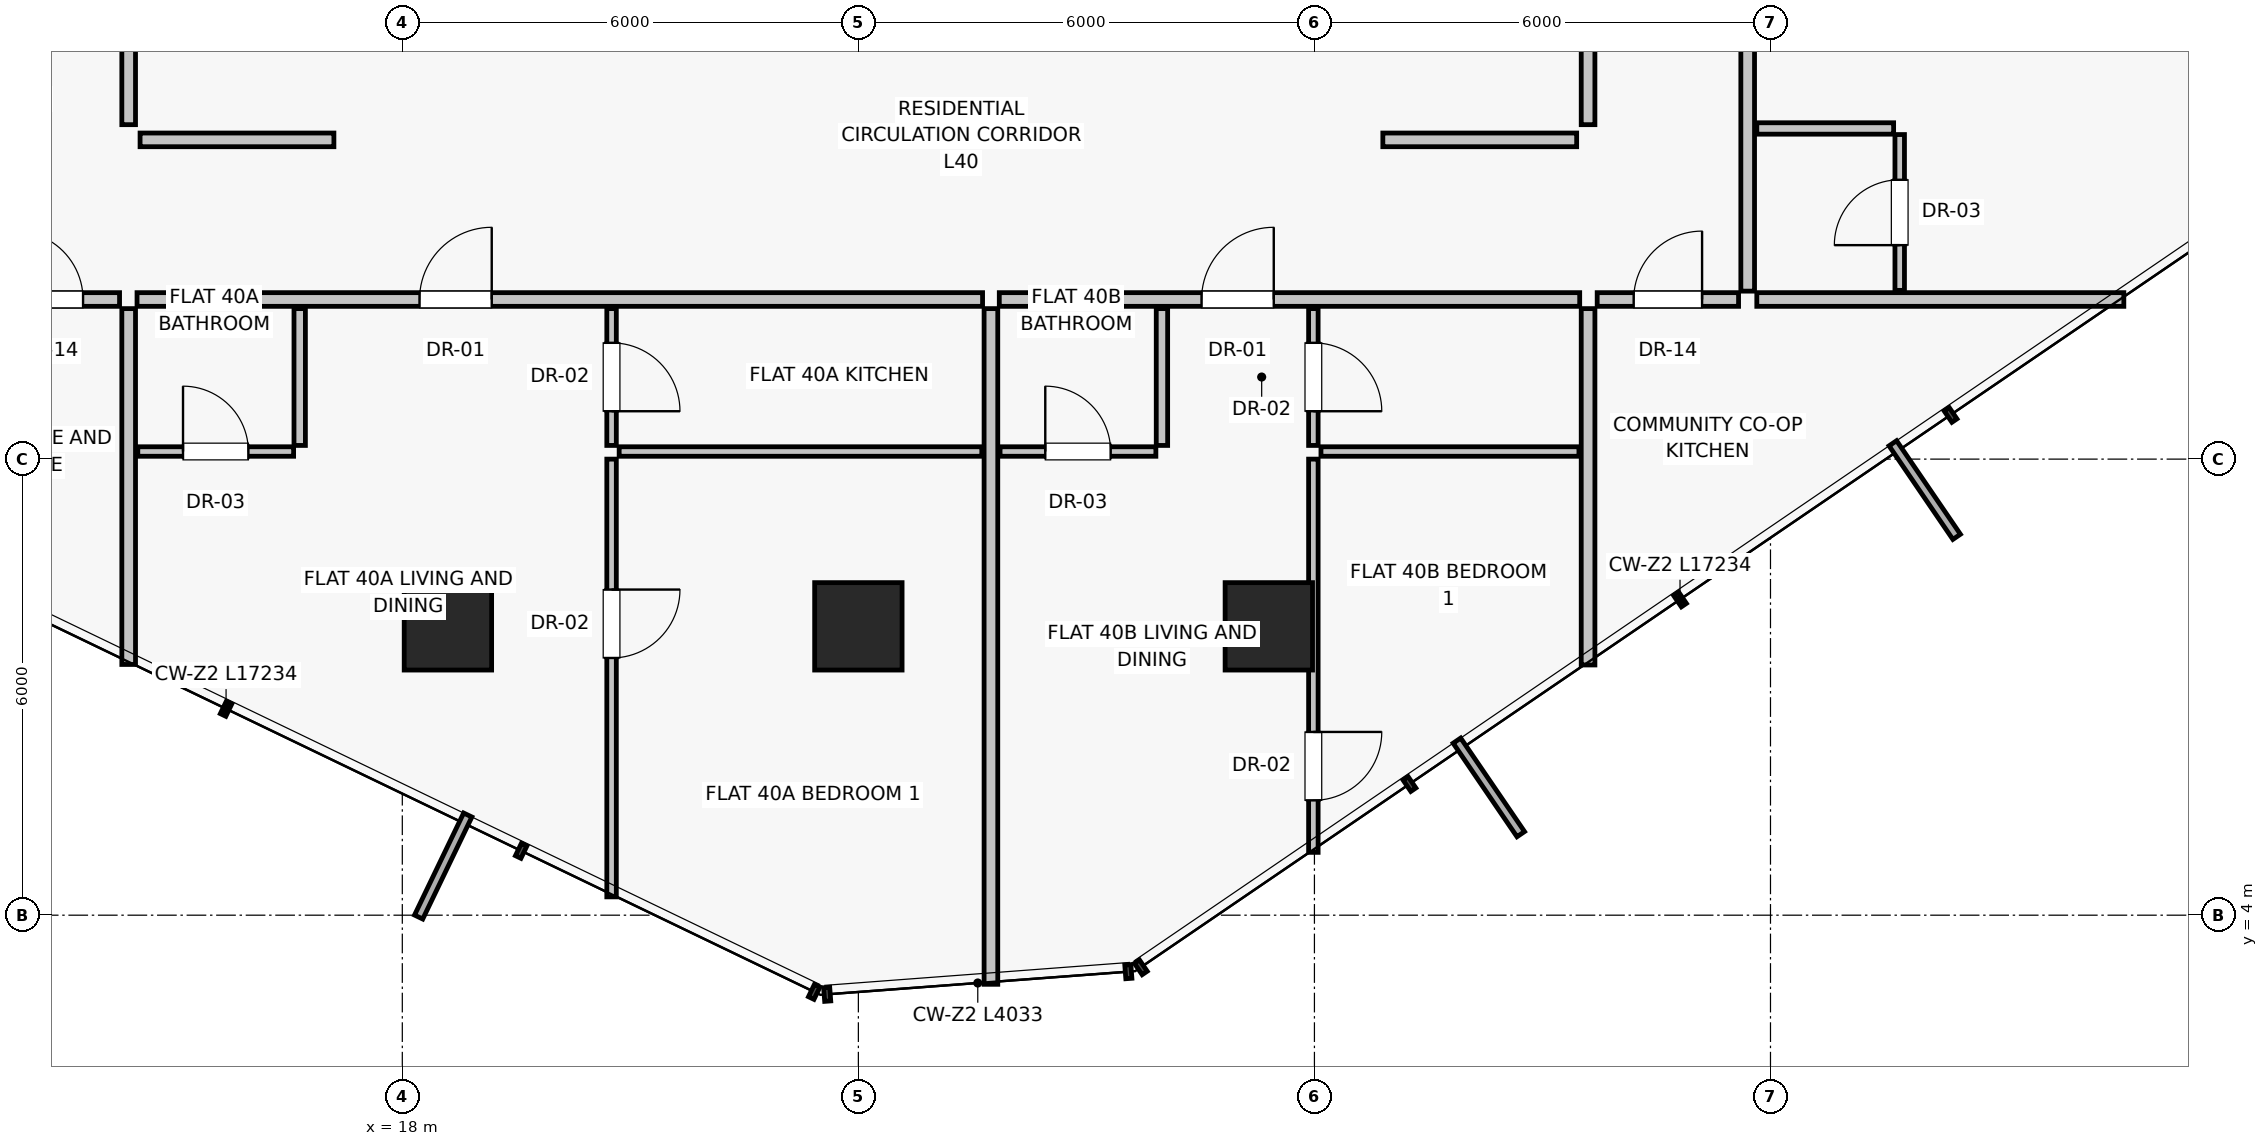
"""IFC4 building model, lengths in metres.
Left out: names, types, materials, properties, quantities, classifications, styles, units other than length and angle.
Written with IfcOpenShell. Run it as: python <this file> out.ifc"""

import sys

from ifc_helpers import new_model, si_unit, direction, frame, frame_2d, origin, origin_2d, place, context, subcontext, project, spatial, rectangle, extrude, source, transform, mapped, element, fill, save


model = new_model("IFC4")
c1 = context("Model", 3, precision=1e-05, world=origin(), true_north=direction((0.0, 1.0)))
c2 = subcontext(c1, "Body", "Model", "MODEL_VIEW")
j1 = project(units=[si_unit("LENGTHUNIT", "METRE"), si_unit("PLANEANGLEUNIT", "RADIAN")], contexts=[c1])
p1 = place(None, origin())
s1 = spatial("IfcSite", under=j1, at=p1, CompositionType="ELEMENT")
p2 = place(p1, origin())
s2 = spatial("IfcBuilding", under=s1, at=p2, CompositionType="ELEMENT")
p3 = place(p2, frame((0.0, 0.0, 142.5)))
s3 = spatial("IfcBuildingStorey", under=s2, at=p3, CompositionType="ELEMENT", Elevation=142.5)
for number, where, z_axis, x_axis in (
    (1, (18.6, 7.8, 0.0), (0.0, 0.0, 1.0), (1.0, 0.0, 0.0)),
    (2, (24.0, 7.8, 0.0), (0.0, 0.0, 1.0), (1.0, 0.0, 0.0)),
    (3, (29.4, 7.8, 0.0), (0.0, 0.0, 1.0), (1.0, 0.0, 0.0)),
):
    element("IfcColumn", number, at=place(p3, frame(where, z_axis=z_axis, x_axis=x_axis)), inside=s3, PredefinedType="COLUMN", context=c2, shape_type="SweptSolid", body=[
        extrude(rectangle(XDim=1.15, YDim=1.15, at=origin_2d()), origin(), (0.0, 0.0, 1.0), 3.25),
    ])
p4 = place(p3, frame((14.4, 14.4, 0.0), z_axis=(0.0, 0.0, 1.0), x_axis=(0.0, 1.0, 0.0)))
e4 = element("IfcWall", 4, at=p4, inside=s3, PredefinedType="PARTITIONING", context=c2, shape_type="SweptSolid", body=[
    extrude(rectangle(XDim=9.4, YDim=0.18, at=frame_2d((4.7, 0.0))), origin(), (0.0, 0.0, 1.0), 3.0),
])
p5 = place(p4, frame((3.8, 0.0, 0.0)))
e5 = element("IfcOpeningElement", 5, at=p5, cuts=e4, PredefinedType="OPENING", context=c2, shape_type="SweptSolid", body=[
    extrude(rectangle(XDim=0.9, YDim=2.01, at=frame_2d((0.45, 1.005))), frame((0.0, 0.1, 0.0), z_axis=(0.0, -1.0, 0.0), x_axis=(1.0, 0.0, 0.0)), (0.0, 0.0, 1.0), 0.2),
])
p6 = place(p3, frame((33.6, 14.4, 0.0), z_axis=(0.0, 0.0, 1.0), x_axis=(0.0, 1.0, 0.0)))
e6 = element("IfcWall", 6, at=p6, inside=s3, PredefinedType="PARTITIONING", context=c2, shape_type="SweptSolid", body=[
    extrude(rectangle(XDim=9.4, YDim=0.18, at=frame_2d((4.7, 0.0))), origin(), (0.0, 0.0, 1.0), 3.0),
])
p7 = place(p6, frame((3.8, 0.0, 0.0)))
e7 = element("IfcOpeningElement", 7, at=p7, cuts=e6, PredefinedType="OPENING", context=c2, shape_type="SweptSolid", body=[
    extrude(rectangle(XDim=0.9, YDim=2.01, at=frame_2d((0.45, 1.005))), frame((0.0, 0.1, 0.0), z_axis=(0.0, -1.0, 0.0), x_axis=(1.0, 0.0, 0.0)), (0.0, 0.0, 1.0), 0.2),
])
for number, where, z_axis, x_axis in (
    (8, (14.55, 14.2, 0.0), (0.0, 0.0, 1.0), (1.0, 0.0, 0.0)),
    (9, (30.9, 14.2, 0.0), (0.0, 0.0, 1.0), (1.0, 0.0, 0.0)),
):
    element("IfcWall", number, at=place(p3, frame(where, z_axis=z_axis, x_axis=x_axis)), inside=s3, PredefinedType="PARTITIONING", context=c2, shape_type="SweptSolid", body=[
        extrude(rectangle(XDim=2.55, YDim=0.18, at=frame_2d((1.275, 0.0))), origin(), (0.0, 0.0, 1.0), 3.0),
    ])
p8 = place(p3, frame((14.4, 11.98, 0.0), z_axis=(0.0, 0.0, 1.0), x_axis=(0.0, -1.0, 0.0)))
e10 = element("IfcWall", 10, at=p8, inside=s3, PredefinedType="PARTITIONING", context=c2, shape_type="SweptSolid", body=[
    extrude(rectangle(XDim=4.681, YDim=0.18, at=frame_2d((2.341, 0.0))), origin(), (0.0, 0.0, 1.0), 3.0),
])
p9 = place(p3, frame((33.6, 11.98, 0.0), z_axis=(0.0, 0.0, 1.0), x_axis=(0.0, -1.0, 0.0)))
e11 = element("IfcWall", 11, at=p9, inside=s3, PredefinedType="PARTITIONING", context=c2, shape_type="SweptSolid", body=[
    extrude(rectangle(XDim=4.688, YDim=0.18, at=frame_2d((2.344, 0.0))), origin(), (0.0, 0.0, 1.0), 3.0),
])
p10 = place(p3, frame((14.51, 12.1, 0.0), z_axis=(0.0, 0.0, 1.0), x_axis=(1.0, 0.0, 0.0)))
e12 = element("IfcWall", 12, at=p10, inside=s3, PredefinedType="PARTITIONING", context=c2, shape_type="SweptSolid", body=[
    extrude(rectangle(XDim=11.124, YDim=0.18, at=frame_2d((5.562, 0.0))), origin(), (0.0, 0.0, 1.0), 2.58),
])
p11 = place(p10, frame((3.717, 0.0, 0.0)))
e13 = element("IfcOpeningElement", 13, at=p11, cuts=e12, PredefinedType="OPENING", context=c2, shape_type="SweptSolid", body=[
    extrude(rectangle(XDim=0.95, YDim=2.02, at=frame_2d((0.475, 1.01))), frame((0.0, 0.1, 0.0), z_axis=(0.0, -1.0, 0.0), x_axis=(1.0, 0.0, 0.0)), (0.0, 0.0, 1.0), 0.2),
])
p12 = place(p3, frame((16.65, 11.98, 0.0), z_axis=(0.0, 0.0, 1.0), x_axis=(0.0, -1.0, 0.0)))
e14 = element("IfcWall", 14, at=p12, inside=s3, PredefinedType="PARTITIONING", context=c2, shape_type="SweptSolid", body=[
    extrude(rectangle(XDim=1.8, YDim=0.15, at=frame_2d((0.9, 0.0))), origin(), (0.0, 0.0, 1.0), 3.0),
])
p13 = place(p3, frame((14.52, 10.1, 0.0), z_axis=(0.0, 0.0, 1.0), x_axis=(1.0, 0.0, 0.0)))
e15 = element("IfcWall", 15, at=p13, inside=s3, PredefinedType="PARTITIONING", context=c2, shape_type="SweptSolid", body=[
    extrude(rectangle(XDim=2.05, YDim=0.125, at=frame_2d((1.025, 0.0))), origin(), (0.0, 0.0, 1.0), 3.0),
])
p14 = place(p13, frame((0.595, 0.0, 0.0)))
e16 = element("IfcOpeningElement", 16, at=p14, cuts=e15, PredefinedType="OPENING", context=c2, shape_type="SweptSolid", body=[
    extrude(rectangle(XDim=0.86, YDim=2.01, at=frame_2d((0.43, 1.005))), frame((0.0, 0.073, 0.0), z_axis=(0.0, -1.0, 0.0), x_axis=(1.0, 0.0, 0.0)), (0.0, 0.0, 1.0), 0.145),
])
p15 = place(p3, frame((20.753, 11.98, 0.0), z_axis=(0.0, 0.0, 1.0), x_axis=(0.0, -1.0, 0.0)))
e17 = element("IfcWall", 17, at=p15, inside=s3, PredefinedType="PARTITIONING", context=c2, shape_type="SweptSolid", body=[
    extrude(rectangle(XDim=1.8, YDim=0.125, at=frame_2d((0.9, 0.0))), origin(), (0.0, 0.0, 1.0), 3.0),
])
p16 = place(p15, frame((0.45, 0.0, 0.0)))
e18 = element("IfcOpeningElement", 18, at=p16, cuts=e17, PredefinedType="OPENING", context=c2, shape_type="SweptSolid", body=[
    extrude(rectangle(XDim=0.9, YDim=2.01, at=frame_2d((0.45, 1.005))), frame((0.0, 0.073, 0.0), z_axis=(0.0, -1.0, 0.0), x_axis=(1.0, 0.0, 0.0)), (0.0, 0.0, 1.0), 0.145),
])
p17 = place(p3, frame((20.853, 10.1, 0.0), z_axis=(0.0, 0.0, 1.0), x_axis=(1.0, 0.0, 0.0)))
e19 = element("IfcWall", 19, at=p17, inside=s3, PredefinedType="PARTITIONING", context=c2, shape_type="SweptSolid", body=[
    extrude(rectangle(XDim=4.771, YDim=0.125, at=frame_2d((2.385, 0.0))), origin(), (0.0, 0.0, 1.0), 3.0),
])
p18 = place(p3, frame((20.753, 10.0, 0.0), z_axis=(0.0, 0.0, 1.0), x_axis=(0.0, -1.0, 0.0)))
e20 = element("IfcWall", 20, at=p18, inside=s3, PredefinedType="PARTITIONING", context=c2, shape_type="SweptSolid", body=[
    extrude(rectangle(XDim=5.759, YDim=0.125, at=frame_2d((2.879, 0.0))), origin(), (0.0, 0.0, 1.0), 3.0),
])
p19 = place(p18, frame((1.716, 0.0, 0.0)))
e21 = element("IfcOpeningElement", 21, at=p19, cuts=e20, PredefinedType="OPENING", context=c2, shape_type="SweptSolid", body=[
    extrude(rectangle(XDim=0.9, YDim=2.01, at=frame_2d((0.45, 1.005))), frame((0.0, 0.073, 0.0), z_axis=(0.0, -1.0, 0.0), x_axis=(1.0, 0.0, 0.0)), (0.0, 0.0, 1.0), 0.145),
])
p20 = place(p3, frame((25.744, 11.98, 0.0), z_axis=(0.0, 0.0, 1.0), x_axis=(0.0, -1.0, 0.0)))
e22 = element("IfcWall", 22, at=p20, inside=s3, PredefinedType="PARTITIONING", context=c2, shape_type="SweptSolid", body=[
    extrude(rectangle(XDim=8.889, YDim=0.18, at=frame_2d((4.445, 0.0))), origin(), (0.0, 0.0, 1.0), 3.0),
])
p21 = place(p3, frame((25.854, 12.1, 0.0), z_axis=(0.0, 0.0, 1.0), x_axis=(1.0, 0.0, 0.0)))
e23 = element("IfcWall", 23, at=p21, inside=s3, PredefinedType="PARTITIONING", context=c2, shape_type="SweptSolid", body=[
    extrude(rectangle(XDim=7.636, YDim=0.18, at=frame_2d((3.818, 0.0))), origin(), (0.0, 0.0, 1.0), 2.58),
])
p22 = place(p21, frame((2.661, 0.0, 0.0)))
e24 = element("IfcOpeningElement", 24, at=p22, cuts=e23, PredefinedType="OPENING", context=c2, shape_type="SweptSolid", body=[
    extrude(rectangle(XDim=0.95, YDim=2.02, at=frame_2d((0.475, 1.01))), frame((0.0, 0.1, 0.0), z_axis=(0.0, -1.0, 0.0), x_axis=(1.0, 0.0, 0.0)), (0.0, 0.0, 1.0), 0.2),
])
p23 = place(p3, frame((27.994, 11.98, 0.0), z_axis=(0.0, 0.0, 1.0), x_axis=(0.0, -1.0, 0.0)))
e25 = element("IfcWall", 25, at=p23, inside=s3, PredefinedType="PARTITIONING", context=c2, shape_type="SweptSolid", body=[
    extrude(rectangle(XDim=1.8, YDim=0.15, at=frame_2d((0.9, 0.0))), origin(), (0.0, 0.0, 1.0), 3.0),
])
p24 = place(p3, frame((25.864, 10.1, 0.0), z_axis=(0.0, 0.0, 1.0), x_axis=(1.0, 0.0, 0.0)))
e26 = element("IfcWall", 26, at=p24, inside=s3, PredefinedType="PARTITIONING", context=c2, shape_type="SweptSolid", body=[
    extrude(rectangle(XDim=2.05, YDim=0.125, at=frame_2d((1.025, 0.0))), origin(), (0.0, 0.0, 1.0), 3.0),
])
p25 = place(p24, frame((0.595, 0.0, 0.0)))
e27 = element("IfcOpeningElement", 27, at=p25, cuts=e26, PredefinedType="OPENING", context=c2, shape_type="SweptSolid", body=[
    extrude(rectangle(XDim=0.86, YDim=2.01, at=frame_2d((0.43, 1.005))), frame((0.0, 0.073, 0.0), z_axis=(0.0, -1.0, 0.0), x_axis=(1.0, 0.0, 0.0)), (0.0, 0.0, 1.0), 0.145),
])
p26 = place(p3, frame((29.986, 11.98, 0.0), z_axis=(0.0, 0.0, 1.0), x_axis=(0.0, -1.0, 0.0)))
e28 = element("IfcWall", 28, at=p26, inside=s3, PredefinedType="PARTITIONING", context=c2, shape_type="SweptSolid", body=[
    extrude(rectangle(XDim=1.8, YDim=0.125, at=frame_2d((0.9, 0.0))), origin(), (0.0, 0.0, 1.0), 2.378),
])
p27 = place(p26, frame((0.45, 0.0, 0.0)))
e29 = element("IfcOpeningElement", 29, at=p27, cuts=e28, PredefinedType="OPENING", context=c2, shape_type="SweptSolid", body=[
    extrude(rectangle(XDim=0.9, YDim=2.01, at=frame_2d((0.45, 1.005))), frame((0.0, 0.073, 0.0), z_axis=(0.0, -1.0, 0.0), x_axis=(1.0, 0.0, 0.0)), (0.0, 0.0, 1.0), 0.145),
])
p28 = place(p3, frame((30.086, 10.1, 0.0), z_axis=(0.0, 0.0, 1.0), x_axis=(1.0, 0.0, 0.0)))
e30 = element("IfcWall", 30, at=p28, inside=s3, PredefinedType="PARTITIONING", context=c2, shape_type="SweptSolid", body=[
    extrude(rectangle(XDim=3.394, YDim=0.125, at=frame_2d((1.697, 0.0))), origin(), (0.0, 0.0, 1.0), 3.0),
])
p29 = place(p3, frame((29.986, 10.0, 0.0), z_axis=(0.0, 0.0, 1.0), x_axis=(0.0, -1.0, 0.0)))
e31 = element("IfcWall", 31, at=p29, inside=s3, PredefinedType="PARTITIONING", context=c2, shape_type="SweptSolid", body=[
    extrude(rectangle(XDim=5.174, YDim=0.125, at=frame_2d((2.587, 0.0))), origin(), (0.0, 0.0, 1.0), 2.378),
])
p30 = place(p29, frame((3.589, 0.0, 0.0)))
e32 = element("IfcOpeningElement", 32, at=p30, cuts=e31, PredefinedType="OPENING", context=c2, shape_type="SweptSolid", body=[
    extrude(rectangle(XDim=0.9, YDim=2.01, at=frame_2d((0.45, 1.005))), frame((0.0, 0.073, 0.0), z_axis=(0.0, -1.0, 0.0), x_axis=(1.0, 0.0, 0.0)), (0.0, 0.0, 1.0), 0.145),
])
p31 = place(p3, frame((35.82, 12.1, 0.0), z_axis=(0.0, 0.0, 1.0), x_axis=(1.0, 0.0, 0.0)))
e33 = element("IfcWall", 33, at=p31, inside=s3, PredefinedType="PARTITIONING", context=c2, shape_type="SweptSolid", body=[
    extrude(rectangle(XDim=4.829, YDim=0.18, at=frame_2d((2.414, 0.0))), origin(), (0.0, 0.0, 1.0), 3.0),
])
p32 = place(p3, frame((35.7, 12.21, 0.0), z_axis=(0.0, 0.0, 1.0), x_axis=(0.0, 1.0, 0.0)))
e34 = element("IfcWall", 34, at=p32, inside=s3, PredefinedType="PARTITIONING", context=c2, shape_type="SweptSolid", body=[
    extrude(rectangle(XDim=13.628, YDim=0.18, at=frame_2d((6.814, 0.0))), origin(), (0.0, 0.0, 1.0), 2.58),
])
p33 = place(p32, frame((4.348, 0.0, 0.0)))
e35 = element("IfcOpeningElement", 35, at=p33, cuts=e34, PredefinedType="OPENING", context=c2, shape_type="SweptSolid", body=[
    extrude(rectangle(XDim=0.95, YDim=2.02, at=frame_2d((0.475, 1.01))), frame((0.0, 0.1, 0.0), z_axis=(0.0, -1.0, 0.0), x_axis=(1.0, 0.0, 0.0)), (0.0, 0.0, 1.0), 0.2),
])
p34 = place(p3, frame((35.82, 14.35, 0.0), z_axis=(0.0, 0.0, 1.0), x_axis=(1.0, 0.0, 0.0)))
e36 = element("IfcWall", 36, at=p34, inside=s3, PredefinedType="PARTITIONING", context=c2, shape_type="SweptSolid", body=[
    extrude(rectangle(XDim=1.8, YDim=0.15, at=frame_2d((0.9, 0.0))), origin(), (0.0, 0.0, 1.0), 3.0),
])
p35 = place(p3, frame((37.7, 12.22, 0.0), z_axis=(0.0, 0.0, 1.0), x_axis=(0.0, 1.0, 0.0)))
e37 = element("IfcWall", 37, at=p35, inside=s3, PredefinedType="PARTITIONING", context=c2, shape_type="SweptSolid", body=[
    extrude(rectangle(XDim=2.05, YDim=0.125, at=frame_2d((1.025, 0.0))), origin(), (0.0, 0.0, 1.0), 3.0),
])
p36 = place(p35, frame((0.595, 0.0, 0.0)))
e38 = element("IfcOpeningElement", 38, at=p36, cuts=e37, PredefinedType="OPENING", context=c2, shape_type="SweptSolid", body=[
    extrude(rectangle(XDim=0.86, YDim=2.01, at=frame_2d((0.43, 1.005))), frame((0.0, 0.073, 0.0), z_axis=(0.0, -1.0, 0.0), x_axis=(1.0, 0.0, 0.0)), (0.0, 0.0, 1.0), 0.145),
])
p37 = place(p3, frame((12.42, 12.1, 0.0), z_axis=(0.0, 0.0, 1.0), x_axis=(1.0, 0.0, 0.0)))
e39 = element("IfcWall", 39, at=p37, inside=s3, PredefinedType="PARTITIONING", context=c2, shape_type="SweptSolid", body=[
    extrude(rectangle(XDim=1.86, YDim=0.18, at=frame_2d((0.93, 0.0))), origin(), (0.0, 0.0, 1.0), 3.0),
])
p38 = place(p37, frame((0.48, 0.0, 0.0)))
e40 = element("IfcOpeningElement", 40, at=p38, cuts=e39, PredefinedType="OPENING", context=c2, shape_type="SweptSolid", body=[
    extrude(rectangle(XDim=0.9, YDim=2.01, at=frame_2d((0.45, 1.005))), frame((0.0, 0.1, 0.0), z_axis=(0.0, -1.0, 0.0), x_axis=(1.0, 0.0, 0.0)), (0.0, 0.0, 1.0), 0.2),
])
p39 = place(p3, frame((33.72, 12.1, 0.0), z_axis=(0.0, 0.0, 1.0), x_axis=(1.0, 0.0, 0.0)))
e41 = element("IfcWall", 41, at=p39, inside=s3, PredefinedType="PARTITIONING", context=c2, shape_type="SweptSolid", body=[
    extrude(rectangle(XDim=1.86, YDim=0.18, at=frame_2d((0.93, 0.0))), origin(), (0.0, 0.0, 1.0), 3.0),
])
p40 = place(p39, frame((0.48, 0.0, 0.0)))
e42 = element("IfcOpeningElement", 42, at=p40, cuts=e41, PredefinedType="OPENING", context=c2, shape_type="SweptSolid", body=[
    extrude(rectangle(XDim=0.9, YDim=2.01, at=frame_2d((0.45, 1.005))), frame((0.0, 0.1, 0.0), z_axis=(0.0, -1.0, 0.0), x_axis=(1.0, 0.0, 0.0)), (0.0, 0.0, 1.0), 0.2),
])
m1 = source(origin(), c2, "Body", "SweptSolid", [
    extrude(rectangle(XDim=0.95, YDim=2.02, at=frame_2d((0.475, 1.01))), frame((0.0, 0.025, 0.0), z_axis=(0.0, -1.0, 0.0), x_axis=(1.0, 0.0, 0.0)), (0.0, 0.0, 1.0), 0.05),
])
p41 = place(p11, origin())
e43 = element("IfcDoor", 43, at=p41, inside=s3, OperationType="SINGLE_SWING_RIGHT", PredefinedType="DOOR", context=c2, shape_type="MappedRepresentation", body=[
    mapped(m1, transform((0.0, 0.0, 0.0), scale=1.0)),
])
fill(e13, e43)
m2 = source(origin(), c2, "Body", "SweptSolid", [
    extrude(rectangle(XDim=0.86, YDim=2.01, at=frame_2d((0.43, 1.005))), frame((0.0, 0.025, 0.0), z_axis=(0.0, -1.0, 0.0), x_axis=(1.0, 0.0, 0.0)), (0.0, 0.0, 1.0), 0.05),
])
p42 = place(p14, origin())
e44 = element("IfcDoor", 44, at=p42, inside=s3, OperationType="SINGLE_SWING_LEFT", PredefinedType="DOOR", context=c2, shape_type="MappedRepresentation", body=[
    mapped(m2, transform((0.0, 0.0, 0.0), scale=1.0)),
])
fill(e16, e44)
m3 = source(origin(), c2, "Body", "SweptSolid", [
    extrude(rectangle(XDim=0.9, YDim=2.01, at=frame_2d((0.45, 1.005))), frame((0.0, 0.025, 0.0), z_axis=(0.0, -1.0, 0.0), x_axis=(1.0, 0.0, 0.0)), (0.0, 0.0, 1.0), 0.05),
])
p43 = place(p16, origin())
e45 = element("IfcDoor", 45, at=p43, inside=s3, OperationType="SINGLE_SWING_RIGHT", PredefinedType="DOOR", context=c2, shape_type="MappedRepresentation", body=[
    mapped(m3, transform((0.0, 0.0, 0.0), scale=1.0)),
])
fill(e18, e45)
p44 = place(p19, origin())
e46 = element("IfcDoor", 46, at=p44, inside=s3, OperationType="SINGLE_SWING_LEFT", PredefinedType="DOOR", context=c2, shape_type="MappedRepresentation", body=[
    mapped(m3, transform((0.0, 0.0, 0.0), scale=1.0)),
])
fill(e21, e46)
p45 = place(p22, origin())
e47 = element("IfcDoor", 47, at=p45, inside=s3, OperationType="SINGLE_SWING_RIGHT", PredefinedType="DOOR", context=c2, shape_type="MappedRepresentation", body=[
    mapped(m1, transform((0.0, 0.0, 0.0), scale=1.0)),
])
fill(e24, e47)
p46 = place(p25, origin())
e48 = element("IfcDoor", 48, at=p46, inside=s3, OperationType="SINGLE_SWING_LEFT", PredefinedType="DOOR", context=c2, shape_type="MappedRepresentation", body=[
    mapped(m2, transform((0.0, 0.0, 0.0), scale=1.0)),
])
fill(e27, e48)
p47 = place(p27, origin())
e49 = element("IfcDoor", 49, at=p47, inside=s3, OperationType="SINGLE_SWING_RIGHT", PredefinedType="DOOR", context=c2, shape_type="MappedRepresentation", body=[
    mapped(m3, transform((0.0, 0.0, 0.0), scale=1.0)),
])
fill(e29, e49)
p48 = place(p30, origin())
e50 = element("IfcDoor", 50, at=p48, inside=s3, OperationType="SINGLE_SWING_LEFT", PredefinedType="DOOR", context=c2, shape_type="MappedRepresentation", body=[
    mapped(m3, transform((0.0, 0.0, 0.0), scale=1.0)),
])
fill(e32, e50)
p49 = place(p36, origin())
e51 = element("IfcDoor", 51, at=p49, inside=s3, OperationType="SINGLE_SWING_LEFT", PredefinedType="DOOR", context=c2, shape_type="MappedRepresentation", body=[
    mapped(m2, transform((0.0, 0.0, 0.0), scale=1.0)),
])
fill(e38, e51)
p50 = place(p38, origin())
e52 = element("IfcDoor", 52, at=p50, inside=s3, OperationType="SINGLE_SWING_LEFT", PredefinedType="DOOR", context=c2, shape_type="MappedRepresentation", body=[
    mapped(m3, transform((0.0, 0.0, 0.0), scale=1.0)),
])
fill(e40, e52)
p51 = place(p40, origin())
e53 = element("IfcDoor", 53, at=p51, inside=s3, OperationType="SINGLE_SWING_RIGHT", PredefinedType="DOOR", context=c2, shape_type="MappedRepresentation", body=[
    mapped(m3, transform((0.0, 0.0, 0.0), scale=1.0)),
])
fill(e42, e53)
save(model, sys.argv[1])
